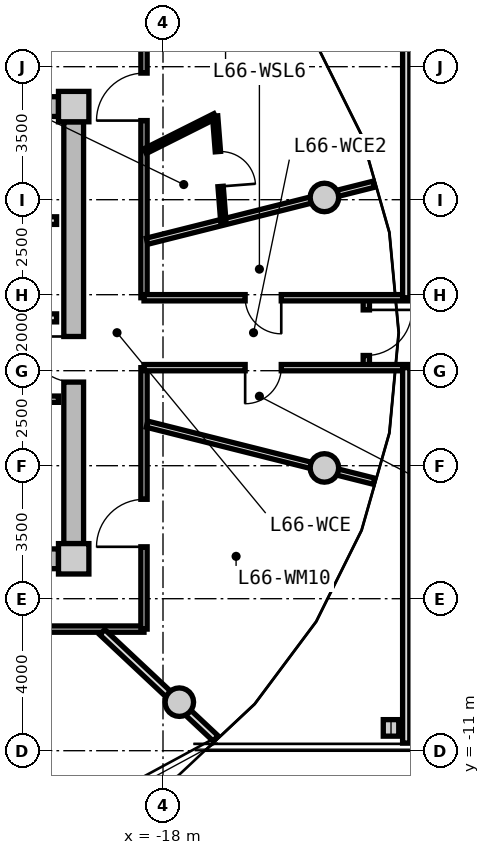
"""IFC4 building model, lengths in metres.
Left out: names, types, materials, properties, quantities, classifications, styles, units other than length and angle.
Written with IfcOpenShell. Run it as: python <this file> out.ifc"""

import sys

from ifc_helpers import new_model, si_unit, direction, frame, frame_2d, origin, origin_2d, place, context, subcontext, project, spatial, rectangle, circle, i_section, extrude, source, transform, mapped, element, fill, save


model = new_model("IFC4")
c1 = context("Model", 3, precision=1e-05, world=origin(), true_north=direction((0.0, 1.0)))
c2 = subcontext(c1, "Body", "Model", "MODEL_VIEW")
j1 = project(units=[si_unit("LENGTHUNIT", "METRE"), si_unit("PLANEANGLEUNIT", "RADIAN")], contexts=[c1])
p1 = place(None, origin())
s1 = spatial("IfcSite", under=j1, at=p1, CompositionType="ELEMENT")
p2 = place(p1, origin())
s2 = spatial("IfcBuilding", under=s1, at=p2, CompositionType="ELEMENT")
p3 = place(p2, frame((0.0, 0.0, 213.9)))
s3 = spatial("IfcBuildingStorey", under=s2, at=p3, CompositionType="ELEMENT", Elevation=213.9)
m1 = source(origin(), c2, "Body", "SweptSolid", [
    extrude(rectangle(XDim=0.8, YDim=0.8, at=origin_2d()), origin(), (0.0, 0.0, 1.0), 3.05),
])
for number, where, z_axis, x_axis in (
    (1, (-20.35, -5.95, 0.0), (0.0, 0.0, 1.0), (1.0, 0.0, 0.0)),
    (2, (-20.35, 5.95, 0.0), (0.0, 0.0, 1.0), (1.0, 0.0, 0.0)),
):
    element("IfcColumn", number, at=place(p3, frame(where, z_axis=z_axis, x_axis=x_axis)), inside=s3, PredefinedType="COLUMN", context=c2, shape_type="MappedRepresentation", body=[
        mapped(m1, transform((0.0, 0.0, 0.0), x_axis=(1.0, 0.0, 0.0), y_axis=(0.0, 1.0, 0.0), z_axis=(0.0, 0.0, 1.0), scale=1.0)),
    ])
m2 = source(origin(), c2, "Body", "SweptSolid", [
    extrude(rectangle(XDim=14.5, YDim=0.52, at=frame_2d((7.25, 0.0))), origin(), (0.0, 0.0, 1.0), 2.76),
])
for number, where, z_axis, x_axis in (
    (3, (-35.25, 5.95, 0.0), (0.0, 0.0, 1.0), (1.0, 0.0, 0.0)),
    (4, (-20.75, -5.95, 0.0), (0.0, 0.0, 1.0), (-1.0, 0.0, 0.0)),
):
    element("IfcWall", number, at=place(p3, frame(where, z_axis=z_axis, x_axis=x_axis)), inside=s3, PredefinedType="SHEAR", context=c2, shape_type="MappedRepresentation", body=[
        mapped(m2, transform((0.0, 0.0, 0.0), x_axis=(1.0, 0.0, 0.0), y_axis=(0.0, 1.0, 0.0), z_axis=(0.0, 0.0, 1.0), scale=1.0)),
    ])
m3 = source(origin(), c2, "Body", "SweptSolid", [
    extrude(rectangle(XDim=11.1, YDim=0.52, at=frame_2d((5.55, 0.0))), origin(), (0.0, 0.0, 1.0), 2.76),
])
p4 = place(p3, frame((-20.35, 5.55, 0.0), z_axis=(0.0, 0.0, 1.0), x_axis=(0.0, -1.0, 0.0)))
e5 = element("IfcWall", 5, at=p4, inside=s3, PredefinedType="SHEAR", context=c2, shape_type="MappedRepresentation", body=[
    mapped(m3, transform((0.0, 0.0, 0.0), x_axis=(1.0, 0.0, 0.0), y_axis=(0.0, 1.0, 0.0), z_axis=(0.0, 0.0, 1.0), scale=1.0)),
])
p5 = place(p4, frame((5.65, 0.0, 0.0)))
e6 = element("IfcOpeningElement", 6, at=p5, cuts=e5, PredefinedType="OPENING", context=c2, shape_type="SweptSolid", body=[
    extrude(rectangle(XDim=1.2, YDim=2.15, at=frame_2d((0.6, 1.075))), frame((0.0, 0.27, 0.0), z_axis=(0.0, -1.0, 0.0), x_axis=(1.0, 0.0, 0.0)), (0.0, 0.0, 1.0), 0.54),
])
m4 = source(origin(), c2, "Body", "SweptSolid", [
    extrude(circle(Radius=0.375, at=origin_2d()), origin(), (0.0, 0.0, 1.0), 3.05),
])
for number, where, z_axis, x_axis in (
    (7, (-13.753, 3.559, 0.0), (0.0, 0.0, 1.0), (1.0, 0.0, 0.0)),
    (8, (-17.57, -9.723, 0.0), (0.0, 0.0, 1.0), (1.0, 0.0, 0.0)),
    (9, (-13.753, -3.559, 0.0), (0.0, 0.0, 1.0), (1.0, 0.0, 0.0)),
):
    element("IfcColumn", number, at=place(p3, frame(where, z_axis=z_axis, x_axis=x_axis)), inside=s3, PredefinedType="COLUMN", context=c2, shape_type="MappedRepresentation", body=[
        mapped(m4, transform((0.0, 0.0, 0.0), x_axis=(1.0, 0.0, 0.0), y_axis=(0.0, 1.0, 0.0), z_axis=(0.0, 0.0, 1.0), scale=1.0)),
    ])
m5 = source(origin(), c2, "Body", "SweptSolid", [
    extrude(i_section(OverallWidth=0.407, OverallDepth=0.435, WebThickness=0.024, FlangeThickness=0.039, FilletRadius=0.015, at=origin_2d()), origin(), (0.0, 0.0, 1.0), 3.05),
])
p6 = place(p3, frame((-12.0, -10.4, 0.0), z_axis=(0.0, 0.0, 1.0), x_axis=(1.0, 0.0, 0.0)))
e10 = element("IfcColumn", 10, at=p6, inside=s3, PredefinedType="COLUMN", context=c2, shape_type="MappedRepresentation", body=[
    mapped(m5, transform((0.0, 0.0, 0.0), x_axis=(1.0, 0.0, 0.0), y_axis=(0.0, 1.0, 0.0), z_axis=(0.0, 0.0, 1.0), scale=1.0)),
])
m6 = source(origin(), c2, "Body", "SweptSolid", [
    extrude(rectangle(XDim=3.2, YDim=0.2, at=frame_2d((1.6, 0.0))), origin(), (0.0, 0.0, 1.0), 2.745),
])
p7 = place(p3, frame((-24.0, 2.95, 0.0), z_axis=(0.0, 0.0, 1.0), x_axis=(1.0, 0.0, 0.0)))
e11 = element("IfcWall", 11, at=p7, inside=s3, PredefinedType="PARTITIONING", context=c2, shape_type="MappedRepresentation", body=[
    mapped(m6, transform((0.0, 0.0, 0.0), x_axis=(1.0, 0.0, 0.0), y_axis=(0.0, 1.0, 0.0), z_axis=(0.0, 0.0, 1.0), scale=1.0)),
])
m7 = source(origin(), c2, "Body", "SweptSolid", [
    extrude(rectangle(XDim=6.66, YDim=0.21, at=frame_2d((3.33, 0.0))), origin(), (0.0, 0.0, 1.0), 2.745),
])
p8 = place(p3, frame((-27.46, 0.39, 0.0), z_axis=(0.0, 0.0, 1.0), x_axis=(1.0, 0.0, 0.0)))
e12 = element("IfcWall", 12, at=p8, inside=s3, PredefinedType="PARTITIONING", context=c2, shape_type="MappedRepresentation", body=[
    mapped(m7, transform((0.0, 0.0, 0.0), x_axis=(1.0, 0.0, 0.0), y_axis=(0.0, 1.0, 0.0), z_axis=(0.0, 0.0, 1.0), scale=1.0)),
])
p9 = place(p8, frame((1.0, 0.0, 0.0)))
e13 = element("IfcOpeningElement", 13, at=p9, cuts=e12, PredefinedType="OPENING", context=c2, shape_type="SweptSolid", body=[
    extrude(rectangle(XDim=1.2, YDim=2.15, at=frame_2d((0.6, 1.075))), frame((0.0, 0.115, 0.0), z_axis=(0.0, -1.0, 0.0), x_axis=(1.0, 0.0, 0.0)), (0.0, 0.0, 1.0), 0.23),
])
m8 = source(origin(), c2, "Body", "SweptSolid", [
    extrude(rectangle(XDim=2.7, YDim=0.165, at=frame_2d((1.35, 0.0))), origin(), (0.0, 0.0, 1.0), 2.745),
])
p10 = place(p3, frame((-23.45, -1.75, 0.0), z_axis=(0.0, 0.0, 1.0), x_axis=(1.0, 0.0, 0.0)))
e14 = element("IfcWall", 14, at=p10, inside=s3, PredefinedType="PARTITIONING", context=c2, shape_type="MappedRepresentation", body=[
    mapped(m8, transform((0.0, 0.0, 0.0), x_axis=(1.0, 0.0, 0.0), y_axis=(0.0, 1.0, 0.0), z_axis=(0.0, 0.0, 1.0), scale=1.0)),
])
p11 = place(p10, frame((0.85, 0.0, 0.0)))
e15 = element("IfcOpeningElement", 15, at=p11, cuts=e14, PredefinedType="OPENING", context=c2, shape_type="SweptSolid", body=[
    extrude(rectangle(XDim=0.925, YDim=2.1, at=frame_2d((0.462, 1.05))), frame((0.0, 0.093, 0.0), z_axis=(0.0, -1.0, 0.0), x_axis=(1.0, 0.0, 0.0)), (0.0, 0.0, 1.0), 0.185),
])
m9 = source(origin(), c2, "Body", "SweptSolid", [
    extrude(rectangle(XDim=19.0, YDim=0.165, at=frame_2d((9.5, 0.0))), origin(), (0.0, 0.0, 1.0), 2.745),
])
p12 = place(p3, frame((-18.5, -7.8, 0.0), z_axis=(0.0, 0.0, 1.0), x_axis=(-1.0, 0.0, 0.0)))
e16 = element("IfcWall", 16, at=p12, inside=s3, PredefinedType="PARTITIONING", context=c2, shape_type="MappedRepresentation", body=[
    mapped(m9, transform((0.0, 0.0, 0.0), x_axis=(1.0, 0.0, 0.0), y_axis=(0.0, 1.0, 0.0), z_axis=(0.0, 0.0, 1.0), scale=1.0)),
])
p13 = place(p12, frame((12.569, 0.0, 0.0)))
e17 = element("IfcOpeningElement", 17, at=p13, cuts=e16, PredefinedType="OPENING", context=c2, shape_type="SweptSolid", body=[
    extrude(rectangle(XDim=1.25, YDim=2.2, at=frame_2d((0.625, 1.1))), frame((0.0, 0.093, 0.0), z_axis=(0.0, -1.0, 0.0), x_axis=(1.0, 0.0, 0.0)), (0.0, 0.0, 1.0), 0.185),
])
p14 = place(p12, frame((8.875, 0.0, 0.0)))
e18 = element("IfcOpeningElement", 18, at=p14, cuts=e16, PredefinedType="OPENING", context=c2, shape_type="SweptSolid", body=[
    extrude(rectangle(XDim=1.25, YDim=2.2, at=frame_2d((0.625, 1.1))), frame((0.0, 0.093, 0.0), z_axis=(0.0, -1.0, 0.0), x_axis=(1.0, 0.0, 0.0)), (0.0, 0.0, 1.0), 0.185),
])
p15 = place(p12, frame((3.559, 0.0, 0.0)))
e19 = element("IfcOpeningElement", 19, at=p15, cuts=e16, PredefinedType="OPENING", context=c2, shape_type="SweptSolid", body=[
    extrude(rectangle(XDim=1.25, YDim=2.2, at=frame_2d((0.625, 1.1))), frame((0.0, 0.093, 0.0), z_axis=(0.0, -1.0, 0.0), x_axis=(1.0, 0.0, 0.0)), (0.0, 0.0, 1.0), 0.185),
])
m10 = source(origin(), c2, "Body", "SweptSolid", [
    extrude(rectangle(XDim=6.88, YDim=0.165, at=frame_2d((3.44, 0.0))), origin(), (0.0, 0.0, 1.0), 2.745),
])
p16 = place(p3, frame((-18.5, 7.8, 0.0), z_axis=(0.0, 0.0, 1.0), x_axis=(0.0, -1.0, 0.0)))
e20 = element("IfcWall", 20, at=p16, inside=s3, PredefinedType="PARTITIONING", context=c2, shape_type="MappedRepresentation", body=[
    mapped(m10, transform((0.0, 0.0, 0.0), x_axis=(1.0, 0.0, 0.0), y_axis=(0.0, 1.0, 0.0), z_axis=(0.0, 0.0, 1.0), scale=1.0)),
])
p17 = place(p16, frame((0.968, 0.0, 0.0)))
e21 = element("IfcOpeningElement", 21, at=p17, cuts=e20, PredefinedType="OPENING", context=c2, shape_type="SweptSolid", body=[
    extrude(rectangle(XDim=1.25, YDim=2.2, at=frame_2d((0.625, 1.1))), frame((0.0, 0.093, 0.0), z_axis=(0.0, -1.0, 0.0), x_axis=(1.0, 0.0, 0.0)), (0.0, 0.0, 1.0), 0.185),
])
p18 = place(p3, frame((-18.5, -0.92, 0.0), z_axis=(0.0, 0.0, 1.0), x_axis=(0.0, -1.0, 0.0)))
e22 = element("IfcWall", 22, at=p18, inside=s3, PredefinedType="PARTITIONING", context=c2, shape_type="MappedRepresentation", body=[
    mapped(m10, transform((0.0, 0.0, 0.0), x_axis=(1.0, 0.0, 0.0), y_axis=(0.0, 1.0, 0.0), z_axis=(0.0, 0.0, 1.0), scale=1.0)),
])
p19 = place(p18, frame((3.464, 0.0, 0.0)))
e23 = element("IfcOpeningElement", 23, at=p19, cuts=e22, PredefinedType="OPENING", context=c2, shape_type="SweptSolid", body=[
    extrude(rectangle(XDim=1.25, YDim=2.2, at=frame_2d((0.625, 1.1))), frame((0.0, 0.093, 0.0), z_axis=(0.0, -1.0, 0.0), x_axis=(1.0, 0.0, 0.0)), (0.0, 0.0, 1.0), 0.185),
])
m11 = source(origin(), c2, "Body", "SweptSolid", [
    extrude(rectangle(XDim=6.157, YDim=0.165, at=frame_2d((3.079, 0.0))), origin(), (0.0, 0.0, 1.0), 2.345),
])
for number, where, z_axis, x_axis in (
    (24, (-18.42, -2.407, 0.0), (0.0, 0.0, 1.0), (0.97, -0.244, 0.0)),
    (25, (-18.42, 2.407, 0.0), (0.0, 0.0, 1.0), (0.97, 0.244, 0.0)),
):
    element("IfcWall", number, at=place(p3, frame(where, z_axis=z_axis, x_axis=x_axis)), inside=s3, PredefinedType="PARTITIONING", context=c2, shape_type="MappedRepresentation", body=[
        mapped(m11, transform((0.0, 0.0, 0.0), x_axis=(1.0, 0.0, 0.0), y_axis=(0.0, 1.0, 0.0), z_axis=(0.0, 0.0, 1.0), scale=1.0)),
    ])
m12 = source(origin(), c2, "Body", "SweptSolid", [
    extrude(rectangle(XDim=2.06, YDim=0.14, at=frame_2d((1.03, 0.0))), origin(), (0.0, 0.0, 1.0), 2.745),
])
p20 = place(p3, frame((-18.47, 4.778, 0.0), z_axis=(0.0, 0.0, 1.0), x_axis=(0.893952568722, 0.448161583444, 0.0)))
e26 = element("IfcWall", 26, at=p20, inside=s3, PredefinedType="PARTITIONING", context=c2, shape_type="MappedRepresentation", body=[
    mapped(m12, transform((0.0, 0.0, 0.0), x_axis=(1.0, 0.0, 0.0), y_axis=(0.0, 1.0, 0.0), z_axis=(0.0, 0.0, 1.0), scale=1.0)),
])
m13 = source(origin(), c2, "Body", "SweptSolid", [
    extrude(rectangle(XDim=2.798, YDim=0.14, at=frame_2d((1.399, 0.0))), origin(), (0.0, 0.0, 1.0), 2.745),
])
p21 = place(p3, frame((-16.629, 5.701, 0.0), z_axis=(0.0, 0.0, 1.0), x_axis=(0.077823984089, -0.996967114553, 0.0)))
e27 = element("IfcWall", 27, at=p21, inside=s3, PredefinedType="PARTITIONING", context=c2, shape_type="MappedRepresentation", body=[
    mapped(m13, transform((0.0, 0.0, 0.0), x_axis=(1.0, 0.0, 0.0), y_axis=(0.0, 1.0, 0.0), z_axis=(0.0, 0.0, 1.0), scale=1.0)),
])
p22 = place(p21, frame((0.939, 0.0, 0.0)))
e28 = element("IfcOpeningElement", 28, at=p22, cuts=e27, PredefinedType="OPENING", context=c2, shape_type="SweptSolid", body=[
    extrude(rectangle(XDim=0.92, YDim=2.1, at=frame_2d((0.46, 1.05))), frame((0.0, 0.08, 0.0), z_axis=(0.0, -1.0, 0.0), x_axis=(1.0, 0.0, 0.0)), (0.0, 0.0, 1.0), 0.16),
])
m14 = source(origin(), c2, "Body", "SweptSolid", [
    extrude(rectangle(XDim=4.089, YDim=0.19, at=frame_2d((2.044, 0.0))), origin(), (0.0, 0.0, 1.0), 2.345),
])
p23 = place(p3, frame((-19.598, -7.88, 0.0), z_axis=(0.0, 0.0, 1.0), x_axis=(0.729401273609, -0.684086092577, 0.0)))
e29 = element("IfcWall", 29, at=p23, inside=s3, PredefinedType="PARTITIONING", context=c2, shape_type="MappedRepresentation", body=[
    mapped(m14, transform((0.0, 0.0, 0.0), x_axis=(1.0, 0.0, 0.0), y_axis=(0.0, 1.0, 0.0), z_axis=(0.0, 0.0, 1.0), scale=1.0)),
])
m15 = source(origin(), c2, "Body", "SweptSolid", [
    extrude(rectangle(XDim=1.84, YDim=0.165, at=frame_2d((0.92, 0.0))), origin(), (0.0, 0.0, 1.0), 2.745),
])
p24 = place(p3, frame((-12.65, -0.92, 0.0), z_axis=(0.0, 0.0, 1.0), x_axis=(0.0, 1.0, 0.0)))
e30 = element("IfcWall", 30, at=p24, inside=s3, PredefinedType="PARTITIONING", context=c2, shape_type="MappedRepresentation", body=[
    mapped(m15, transform((0.0, 0.0, 0.0), x_axis=(1.0, 0.0, 0.0), y_axis=(0.0, 1.0, 0.0), z_axis=(0.0, 0.0, 1.0), scale=1.0)),
])
p25 = place(p24, frame((0.32, 0.0, 0.0)))
e31 = element("IfcOpeningElement", 31, at=p25, cuts=e30, PredefinedType="OPENING", context=c2, shape_type="SweptSolid", body=[
    extrude(rectangle(XDim=1.2, YDim=2.15, at=frame_2d((0.6, 1.075))), frame((0.0, 0.093, 0.0), z_axis=(0.0, -1.0, 0.0), x_axis=(1.0, 0.0, 0.0)), (0.0, 0.0, 1.0), 0.185),
])
m16 = source(origin(), c2, "Body", "SweptSolid", [
    extrude(rectangle(XDim=37.0, YDim=0.165, at=frame_2d((18.5, 0.0))), origin(), (0.0, 0.0, 1.0), 2.745),
])
p26 = place(p3, frame((-18.5, -0.92, 0.0), z_axis=(0.0, 0.0, 1.0), x_axis=(1.0, 0.0, 0.0)))
e32 = element("IfcWall", 32, at=p26, inside=s3, PredefinedType="PARTITIONING", context=c2, shape_type="MappedRepresentation", body=[
    mapped(m16, transform((0.0, 0.0, 0.0), x_axis=(1.0, 0.0, 0.0), y_axis=(0.0, 1.0, 0.0), z_axis=(0.0, 0.0, 1.0), scale=1.0)),
])
p27 = place(p26, frame((2.662, 0.0, 0.0)))
e33 = element("IfcOpeningElement", 33, at=p27, cuts=e32, PredefinedType="OPENING", context=c2, shape_type="SweptSolid", body=[
    extrude(rectangle(XDim=0.95, YDim=2.1, at=frame_2d((0.475, 1.05))), frame((0.0, 0.093, 0.0), z_axis=(0.0, -1.0, 0.0), x_axis=(1.0, 0.0, 0.0)), (0.0, 0.0, 1.0), 0.185),
])
p28 = place(p26, frame((33.388, 0.0, 0.0)))
e34 = element("IfcOpeningElement", 34, at=p28, cuts=e32, PredefinedType="OPENING", context=c2, shape_type="SweptSolid", body=[
    extrude(rectangle(XDim=0.95, YDim=2.1, at=frame_2d((0.475, 1.05))), frame((0.0, 0.093, 0.0), z_axis=(0.0, -1.0, 0.0), x_axis=(1.0, 0.0, 0.0)), (0.0, 0.0, 1.0), 0.185),
])
p29 = place(p26, frame((9.075, 0.0, 0.0)))
e35 = element("IfcOpeningElement", 35, at=p29, cuts=e32, PredefinedType="OPENING", context=c2, shape_type="SweptSolid", body=[
    extrude(rectangle(XDim=1.25, YDim=2.2, at=frame_2d((0.625, 1.1))), frame((0.0, 0.093, 0.0), z_axis=(0.0, -1.0, 0.0), x_axis=(1.0, 0.0, 0.0)), (0.0, 0.0, 1.0), 0.185),
])
p30 = place(p26, frame((14.875, 0.0, 0.0)))
e36 = element("IfcOpeningElement", 36, at=p30, cuts=e32, PredefinedType="OPENING", context=c2, shape_type="SweptSolid", body=[
    extrude(rectangle(XDim=1.25, YDim=2.2, at=frame_2d((0.625, 1.1))), frame((0.0, 0.093, 0.0), z_axis=(0.0, -1.0, 0.0), x_axis=(1.0, 0.0, 0.0)), (0.0, 0.0, 1.0), 0.185),
])
p31 = place(p26, frame((20.875, 0.0, 0.0)))
e37 = element("IfcOpeningElement", 37, at=p31, cuts=e32, PredefinedType="OPENING", context=c2, shape_type="SweptSolid", body=[
    extrude(rectangle(XDim=1.25, YDim=2.2, at=frame_2d((0.625, 1.1))), frame((0.0, 0.093, 0.0), z_axis=(0.0, -1.0, 0.0), x_axis=(1.0, 0.0, 0.0)), (0.0, 0.0, 1.0), 0.185),
])
p32 = place(p26, frame((26.675, 0.0, 0.0)))
e38 = element("IfcOpeningElement", 38, at=p32, cuts=e32, PredefinedType="OPENING", context=c2, shape_type="SweptSolid", body=[
    extrude(rectangle(XDim=1.25, YDim=2.2, at=frame_2d((0.625, 1.1))), frame((0.0, 0.093, 0.0), z_axis=(0.0, -1.0, 0.0), x_axis=(1.0, 0.0, 0.0)), (0.0, 0.0, 1.0), 0.185),
])
p33 = place(p3, frame((-18.5, 0.92, 0.0), z_axis=(0.0, 0.0, 1.0), x_axis=(1.0, 0.0, 0.0)))
e39 = element("IfcWall", 39, at=p33, inside=s3, PredefinedType="PARTITIONING", context=c2, shape_type="MappedRepresentation", body=[
    mapped(m16, transform((0.0, 0.0, 0.0), x_axis=(1.0, 0.0, 0.0), y_axis=(0.0, 1.0, 0.0), z_axis=(0.0, 0.0, 1.0), scale=1.0)),
])
p34 = place(p33, frame((2.662, 0.0, 0.0)))
e40 = element("IfcOpeningElement", 40, at=p34, cuts=e39, PredefinedType="OPENING", context=c2, shape_type="SweptSolid", body=[
    extrude(rectangle(XDim=0.95, YDim=2.1, at=frame_2d((0.475, 1.05))), frame((0.0, 0.093, 0.0), z_axis=(0.0, -1.0, 0.0), x_axis=(1.0, 0.0, 0.0)), (0.0, 0.0, 1.0), 0.185),
])
p35 = place(p33, frame((33.388, 0.0, 0.0)))
e41 = element("IfcOpeningElement", 41, at=p35, cuts=e39, PredefinedType="OPENING", context=c2, shape_type="SweptSolid", body=[
    extrude(rectangle(XDim=0.95, YDim=2.1, at=frame_2d((0.475, 1.05))), frame((0.0, 0.093, 0.0), z_axis=(0.0, -1.0, 0.0), x_axis=(1.0, 0.0, 0.0)), (0.0, 0.0, 1.0), 0.185),
])
p36 = place(p33, frame((7.64, 0.0, 0.0)))
e42 = element("IfcOpeningElement", 42, at=p36, cuts=e39, PredefinedType="OPENING", context=c2, shape_type="SweptSolid", body=[
    extrude(rectangle(XDim=0.92, YDim=2.1, at=frame_2d((0.46, 1.05))), frame((0.0, 0.093, 0.0), z_axis=(0.0, -1.0, 0.0), x_axis=(1.0, 0.0, 0.0)), (0.0, 0.0, 1.0), 0.185),
])
p37 = place(p33, frame((10.275, 0.0, 0.0)))
e43 = element("IfcOpeningElement", 43, at=p37, cuts=e39, PredefinedType="OPENING", context=c2, shape_type="SweptSolid", body=[
    extrude(rectangle(XDim=1.25, YDim=2.2, at=frame_2d((0.625, 1.1))), frame((0.0, 0.093, 0.0), z_axis=(0.0, -1.0, 0.0), x_axis=(1.0, 0.0, 0.0)), (0.0, 0.0, 1.0), 0.185),
])
p38 = place(p33, frame((14.875, 0.0, 0.0)))
e44 = element("IfcOpeningElement", 44, at=p38, cuts=e39, PredefinedType="OPENING", context=c2, shape_type="SweptSolid", body=[
    extrude(rectangle(XDim=1.25, YDim=2.2, at=frame_2d((0.625, 1.1))), frame((0.0, 0.093, 0.0), z_axis=(0.0, -1.0, 0.0), x_axis=(1.0, 0.0, 0.0)), (0.0, 0.0, 1.0), 0.185),
])
p39 = place(p33, frame((20.875, 0.0, 0.0)))
e45 = element("IfcOpeningElement", 45, at=p39, cuts=e39, PredefinedType="OPENING", context=c2, shape_type="SweptSolid", body=[
    extrude(rectangle(XDim=1.25, YDim=2.2, at=frame_2d((0.625, 1.1))), frame((0.0, 0.093, 0.0), z_axis=(0.0, -1.0, 0.0), x_axis=(1.0, 0.0, 0.0)), (0.0, 0.0, 1.0), 0.185),
])
p40 = place(p33, frame((26.675, 0.0, 0.0)))
e46 = element("IfcOpeningElement", 46, at=p40, cuts=e39, PredefinedType="OPENING", context=c2, shape_type="SweptSolid", body=[
    extrude(rectangle(XDim=1.25, YDim=2.2, at=frame_2d((0.625, 1.1))), frame((0.0, 0.093, 0.0), z_axis=(0.0, -1.0, 0.0), x_axis=(1.0, 0.0, 0.0)), (0.0, 0.0, 1.0), 0.185),
])
m17 = source(origin(), c2, "Body", "SweptSolid", [
    extrude(rectangle(XDim=9.88, YDim=0.19, at=frame_2d((4.94, 0.0))), origin(), (0.0, 0.0, 1.0), 2.745),
])
for number, where, z_axis, x_axis in (
    (47, (-11.6, -10.8, 0.0), (0.0, 0.0, 1.0), (0.0, 1.0, 0.0)),
    (48, (-11.6, 0.92, 0.0), (0.0, 0.0, 1.0), (0.0, 1.0, 0.0)),
):
    element("IfcWall", number, at=place(p3, frame(where, z_axis=z_axis, x_axis=x_axis)), inside=s3, PredefinedType="PARTITIONING", context=c2, shape_type="MappedRepresentation", body=[
        mapped(m17, transform((0.0, 0.0, 0.0), x_axis=(1.0, 0.0, 0.0), y_axis=(0.0, 1.0, 0.0), z_axis=(0.0, 0.0, 1.0), scale=1.0)),
    ])
m18 = source(origin(), c2, "Body", "SweptSolid", [
    extrude(rectangle(XDim=1.2, YDim=2.15, at=frame_2d((0.6, 1.075))), frame((0.0, 0.025, 0.0), z_axis=(0.0, -1.0, 0.0), x_axis=(1.0, 0.0, 0.0)), (0.0, 0.0, 1.0), 0.05),
])
p41 = place(p5, frame((1.2, 0.0, 0.0), z_axis=(0.0, 0.0, 1.0), x_axis=(-1.0, 0.0, 0.0)))
e49 = element("IfcDoor", 49, at=p41, inside=s3, OperationType="SINGLE_SWING_RIGHT", PredefinedType="DOOR", context=c2, shape_type="MappedRepresentation", body=[
    mapped(m18, transform((0.0, 0.0, 0.0), x_axis=(1.0, 0.0, 0.0), y_axis=(0.0, 1.0, 0.0), z_axis=(0.0, 0.0, 1.0), scale=1.0)),
])
fill(e6, e49)
m19 = source(origin(), c2, "Body", "SweptSolid", [
    extrude(rectangle(XDim=0.95, YDim=2.1, at=frame_2d((0.475, 1.05))), frame((0.0, 0.025, 0.0), z_axis=(0.0, -1.0, 0.0), x_axis=(1.0, 0.0, 0.0)), (0.0, 0.0, 1.0), 0.05),
])
p42 = place(p27, frame((0.95, 0.0, 0.0), z_axis=(0.0, 0.0, 1.0), x_axis=(-1.0, 0.0, 0.0)))
e50 = element("IfcDoor", 50, at=p42, inside=s3, OperationType="SINGLE_SWING_RIGHT", PredefinedType="DOOR", context=c2, shape_type="MappedRepresentation", body=[
    mapped(m19, transform((0.0, 0.0, 0.0), x_axis=(1.0, 0.0, 0.0), y_axis=(0.0, 1.0, 0.0), z_axis=(0.0, 0.0, 1.0), scale=1.0)),
])
fill(e33, e50)
p43 = place(p34, frame((0.95, 0.0, 0.0), z_axis=(0.0, 0.0, 1.0), x_axis=(-1.0, 0.0, 0.0)))
e51 = element("IfcDoor", 51, at=p43, inside=s3, OperationType="SINGLE_SWING_LEFT", PredefinedType="DOOR", context=c2, shape_type="MappedRepresentation", body=[
    mapped(m19, transform((0.0, 0.0, 0.0), x_axis=(1.0, 0.0, 0.0), y_axis=(0.0, 1.0, 0.0), z_axis=(0.0, 0.0, 1.0), scale=1.0)),
])
fill(e40, e51)
m20 = source(origin(), c2, "Body", "SweptSolid", [
    extrude(rectangle(XDim=1.25, YDim=2.2, at=frame_2d((0.625, 1.1))), frame((0.0, 0.025, 0.0), z_axis=(0.0, -1.0, 0.0), x_axis=(1.0, 0.0, 0.0)), (0.0, 0.0, 1.0), 0.05),
])
p44 = place(p17, frame((1.25, 0.0, 0.0), z_axis=(0.0, 0.0, 1.0), x_axis=(-1.0, 0.0, 0.0)))
e52 = element("IfcDoor", 52, at=p44, inside=s3, OperationType="SINGLE_SWING_LEFT", PredefinedType="DOOR", context=c2, shape_type="MappedRepresentation", body=[
    mapped(m20, transform((0.0, 0.0, 0.0), x_axis=(1.0, 0.0, 0.0), y_axis=(0.0, 1.0, 0.0), z_axis=(0.0, 0.0, 1.0), scale=1.0)),
])
fill(e21, e52)
m21 = source(origin(), c2, "Body", "SweptSolid", [
    extrude(rectangle(XDim=0.92, YDim=2.1, at=frame_2d((0.46, 1.05))), frame((0.0, 0.025, 0.0), z_axis=(0.0, -1.0, 0.0), x_axis=(1.0, 0.0, 0.0)), (0.0, 0.0, 1.0), 0.05),
])
p45 = place(p22, origin())
e53 = element("IfcDoor", 53, at=p45, inside=s3, OperationType="SINGLE_SWING_RIGHT", PredefinedType="DOOR", context=c2, shape_type="MappedRepresentation", body=[
    mapped(m21, transform((0.0, 0.0, 0.0), x_axis=(1.0, 0.0, 0.0), y_axis=(0.0, 1.0, 0.0), z_axis=(0.0, 0.0, 1.0), scale=1.0)),
])
fill(e28, e53)
p46 = place(p19, frame((1.25, 0.0, 0.0), z_axis=(0.0, 0.0, 1.0), x_axis=(-1.0, 0.0, 0.0)))
e54 = element("IfcDoor", 54, at=p46, inside=s3, OperationType="SINGLE_SWING_LEFT", PredefinedType="DOOR", context=c2, shape_type="MappedRepresentation", body=[
    mapped(m20, transform((0.0, 0.0, 0.0), x_axis=(1.0, 0.0, 0.0), y_axis=(0.0, 1.0, 0.0), z_axis=(0.0, 0.0, 1.0), scale=1.0)),
])
fill(e23, e54)
p47 = place(p25, frame((1.2, 0.0, 0.0), z_axis=(0.0, 0.0, 1.0), x_axis=(-1.0, 0.0, 0.0)))
e55 = element("IfcDoor", 55, at=p47, inside=s3, OperationType="SINGLE_SWING_LEFT", PredefinedType="DOOR", context=c2, shape_type="MappedRepresentation", body=[
    mapped(m18, transform((0.0, 0.0, 0.0), x_axis=(1.0, 0.0, 0.0), y_axis=(0.0, 1.0, 0.0), z_axis=(0.0, 0.0, 1.0), scale=1.0)),
])
fill(e31, e55)
save(model, sys.argv[1])
